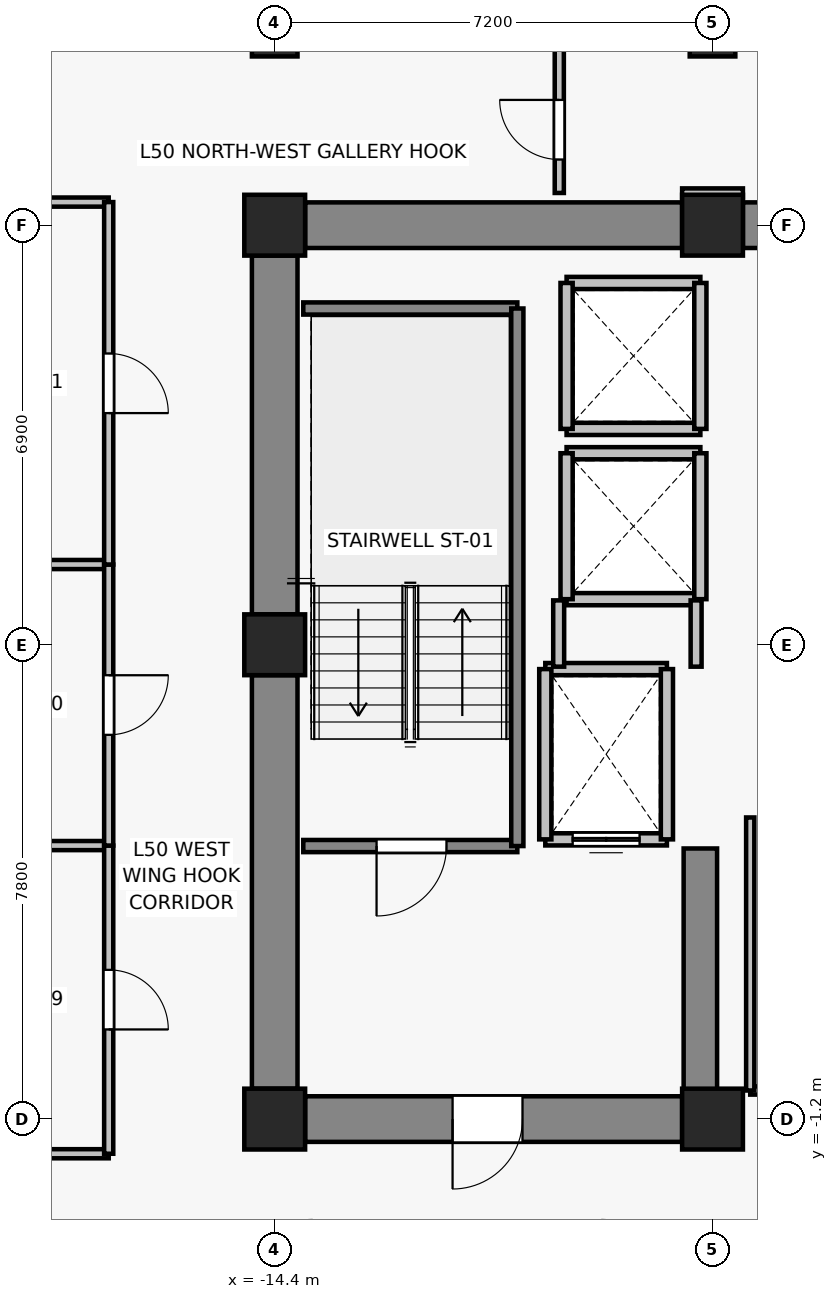
"""IFC4 building model, lengths in metres.
Left out: names, types, materials, properties, quantities, classifications, styles, units other than length and angle.
Written with IfcOpenShell. Run it as: python <this file> out.ifc"""

import sys

from ifc_helpers import new_model, si_unit, direction, frame, frame_2d, origin, origin_2d, place, context, subcontext, project, spatial, rectangle, extrude, source, transform, mapped, element, fill, save


model = new_model("IFC4")
c1 = context("Model", 3, precision=1e-05, world=origin(), true_north=direction((0.0, 1.0)))
c2 = subcontext(c1, "Body", "Model", "MODEL_VIEW")
j1 = project(units=[si_unit("LENGTHUNIT", "METRE"), si_unit("PLANEANGLEUNIT", "RADIAN")], contexts=[c1])
p1 = place(None, origin())
s1 = spatial("IfcSite", under=j1, at=p1, CompositionType="ELEMENT")
p2 = place(p1, origin())
s2 = spatial("IfcBuilding", under=s1, at=p2, CompositionType="ELEMENT")
p3 = place(p2, frame((0.0, 0.0, 179.2)))
s3 = spatial("IfcBuildingStorey", under=s2, at=p3, CompositionType="ELEMENT", Elevation=179.2)
for number, where, z_axis, x_axis in (
    (1, (-14.4, -1.2, 0.0), (0.0, 0.0, 1.0), (1.0, 0.0, 0.0)),
    (2, (-7.2, -1.2, 0.0), (0.0, 0.0, 1.0), (1.0, 0.0, 0.0)),
    (3, (-14.4, 6.6, 0.0), (0.0, 0.0, 1.0), (1.0, 0.0, 0.0)),
    (4, (-14.4, 13.5, 0.0), (0.0, 0.0, 1.0), (1.0, 0.0, 0.0)),
    (5, (-7.2, 13.5, 0.0), (0.0, 0.0, 1.0), (1.0, 0.0, 0.0)),
):
    element("IfcColumn", number, at=place(p3, frame(where, z_axis=z_axis, x_axis=x_axis)), inside=s3, PredefinedType="COLUMN", context=c2, shape_type="SweptSolid", body=[
        extrude(rectangle(XDim=1.0, YDim=1.0, at=origin_2d()), origin(), (0.0, 0.0, 1.0), 3.3),
    ])
for number, where, z_axis, x_axis in (
    (6, (-14.4, 16.65, 0.0), (0.0, 0.0, 1.0), (1.0, 0.0, 0.0)),
    (7, (-7.2, 16.65, 0.0), (0.0, 0.0, 1.0), (1.0, 0.0, 0.0)),
):
    element("IfcColumn", number, at=place(p3, frame(where, z_axis=z_axis, x_axis=x_axis)), inside=s3, PredefinedType="COLUMN", context=c2, shape_type="SweptSolid", body=[
        extrude(rectangle(XDim=0.75, YDim=0.75, at=origin_2d()), origin(), (0.0, 0.0, 1.0), 3.3),
    ])
p4 = place(p3, frame((-13.9, 13.5, 0.0), z_axis=(0.0, 0.0, 1.0), x_axis=(1.0, 0.0, 0.0)))
e8 = element("IfcWall", 8, at=p4, inside=s3, PredefinedType="SHEAR", context=c2, shape_type="SweptSolid", body=[
    extrude(rectangle(XDim=6.2, YDim=0.75, at=frame_2d((3.1, 0.0))), origin(), (0.0, 0.0, 1.0), 3.075),
])
p5 = place(p3, frame((-6.7, 13.5, 0.0), z_axis=(0.0, 0.0, 1.0), x_axis=(1.0, 0.0, 0.0)))
e9 = element("IfcWall", 9, at=p5, inside=s3, PredefinedType="SHEAR", context=c2, shape_type="SweptSolid", body=[
    extrude(rectangle(XDim=13.4, YDim=0.75, at=frame_2d((6.7, 0.0))), origin(), (0.0, 0.0, 1.0), 3.075),
])
p6 = place(p3, frame((-14.4, -0.7, 0.0), z_axis=(0.0, 0.0, 1.0), x_axis=(0.0, 1.0, 0.0)))
e10 = element("IfcWall", 10, at=p6, inside=s3, PredefinedType="SHEAR", context=c2, shape_type="SweptSolid", body=[
    extrude(rectangle(XDim=6.8, YDim=0.75, at=frame_2d((3.4, 0.0))), origin(), (0.0, 0.0, 1.0), 3.075),
])
p7 = place(p3, frame((-14.4, 7.1, 0.0), z_axis=(0.0, 0.0, 1.0), x_axis=(0.0, 1.0, 0.0)))
e11 = element("IfcWall", 11, at=p7, inside=s3, PredefinedType="SHEAR", context=c2, shape_type="SweptSolid", body=[
    extrude(rectangle(XDim=5.9, YDim=0.75, at=frame_2d((2.95, 0.0))), origin(), (0.0, 0.0, 1.0), 3.075),
])
p8 = place(p3, frame((-7.7, -1.2, 0.0), z_axis=(0.0, 0.0, 1.0), x_axis=(-1.0, 0.0, 0.0)))
e12 = element("IfcWall", 12, at=p8, inside=s3, PredefinedType="SHEAR", context=c2, shape_type="SweptSolid", body=[
    extrude(rectangle(XDim=6.2, YDim=0.75, at=frame_2d((3.1, 0.0))), origin(), (0.0, 0.0, 1.0), 3.075),
])
p9 = place(p8, frame((2.625, 0.0, 0.0)))
e13 = element("IfcOpeningElement", 13, at=p9, cuts=e12, PredefinedType="OPENING", context=c2, shape_type="SweptSolid", body=[
    extrude(rectangle(XDim=1.15, YDim=2.15, at=frame_2d((0.575, 1.075))), frame((0.0, 0.385, 0.0), z_axis=(0.0, -1.0, 0.0), x_axis=(1.0, 0.0, 0.0)), (0.0, 0.0, 1.0), 0.77),
])
p10 = place(p3, frame((-7.4, -0.825, 0.0), z_axis=(0.0, 0.0, 1.0), x_axis=(0.0, 1.0, 0.0)))
e14 = element("IfcWall", 14, at=p10, inside=s3, PredefinedType="SHEAR", context=c2, shape_type="SweptSolid", body=[
    extrude(rectangle(XDim=4.075, YDim=0.55, at=frame_2d((2.038, 0.0))), origin(), (0.0, 0.0, 1.0), 3.075),
])
p11 = place(p3, frame((-7.95, 3.4, 0.0), z_axis=(0.0, 0.0, 1.0), x_axis=(-1.0, 0.0, 0.0)))
e15 = element("IfcWall", 15, at=p11, inside=s3, PredefinedType="SOLIDWALL", context=c2, shape_type="SweptSolid", body=[
    extrude(rectangle(XDim=2.0, YDim=0.2, at=frame_2d((1.0, 0.0))), origin(), (0.0, 0.0, 1.0), 3.075),
])
p12 = place(p11, frame((0.45, 0.0, 0.0)))
e16 = element("IfcOpeningElement", 16, at=p12, cuts=e15, PredefinedType="OPENING", context=c2, shape_type="SweptSolid", body=[
    extrude(rectangle(XDim=1.1, YDim=2.2, at=frame_2d((0.55, 1.1))), frame((0.0, 0.11, 0.0), z_axis=(0.0, -1.0, 0.0), x_axis=(1.0, 0.0, 0.0)), (0.0, 0.0, 1.0), 0.22),
])
p13 = place(p3, frame((-9.95, 6.2, 0.0), z_axis=(0.0, 0.0, 1.0), x_axis=(1.0, 0.0, 0.0)))
e17 = element("IfcWall", 17, at=p13, inside=s3, PredefinedType="SOLIDWALL", context=c2, shape_type="SweptSolid", body=[
    extrude(rectangle(XDim=2.0, YDim=0.2, at=frame_2d((1.0, 0.0))), origin(), (0.0, 0.0, 1.0), 3.075),
])
for number, where, z_axis, x_axis in (
    (18, (-9.95, 3.4, 0.0), (0.0, 0.0, 1.0), (0.0, 1.0, 0.0)),
    (19, (-7.95, 6.2, 0.0), (0.0, 0.0, 1.0), (0.0, -1.0, 0.0)),
):
    element("IfcWall", number, at=place(p3, frame(where, z_axis=z_axis, x_axis=x_axis)), inside=s3, PredefinedType="SOLIDWALL", context=c2, shape_type="SweptSolid", body=[
        extrude(rectangle(XDim=2.8, YDim=0.2, at=frame_2d((1.4, 0.0))), origin(), (0.0, 0.0, 1.0), 3.075),
    ])
for number, where, z_axis, x_axis in (
    (20, (-7.4, 7.35, 0.0), (0.0, 0.0, 1.0), (-1.0, 0.0, 0.0)),
    (21, (-9.6, 9.75, 0.0), (0.0, 0.0, 1.0), (1.0, 0.0, 0.0)),
):
    element("IfcWall", number, at=place(p3, frame(where, z_axis=z_axis, x_axis=x_axis)), inside=s3, PredefinedType="SOLIDWALL", context=c2, shape_type="SweptSolid", body=[
        extrude(rectangle(XDim=2.2, YDim=0.2, at=frame_2d((1.1, 0.0))), origin(), (0.0, 0.0, 1.0), 2.565),
    ])
p14 = place(p3, frame((-9.6, 7.35, 0.0), z_axis=(0.0, 0.0, 1.0), x_axis=(0.0, 1.0, 0.0)))
e22 = element("IfcWall", 22, at=p14, inside=s3, PredefinedType="SOLIDWALL", context=c2, shape_type="SweptSolid", body=[
    extrude(rectangle(XDim=2.4, YDim=0.2, at=frame_2d((1.2, 0.0))), origin(), (0.0, 0.0, 1.0), 3.075),
])
p15 = place(p3, frame((-7.4, 9.75, 0.0), z_axis=(0.0, 0.0, 1.0), x_axis=(0.0, -1.0, 0.0)))
e23 = element("IfcWall", 23, at=p15, inside=s3, PredefinedType="SOLIDWALL", context=c2, shape_type="SweptSolid", body=[
    extrude(rectangle(XDim=2.4, YDim=0.2, at=frame_2d((1.2, 0.0))), origin(), (0.0, 0.0, 1.0), 2.565),
])
for number, where, z_axis, x_axis in (
    (24, (-7.4, 10.15, 0.0), (0.0, 0.0, 1.0), (-1.0, 0.0, 0.0)),
    (25, (-9.6, 12.55, 0.0), (0.0, 0.0, 1.0), (1.0, 0.0, 0.0)),
):
    element("IfcWall", number, at=place(p3, frame(where, z_axis=z_axis, x_axis=x_axis)), inside=s3, PredefinedType="SOLIDWALL", context=c2, shape_type="SweptSolid", body=[
        extrude(rectangle(XDim=2.2, YDim=0.2, at=frame_2d((1.1, 0.0))), origin(), (0.0, 0.0, 1.0), 2.565),
    ])
p16 = place(p3, frame((-9.6, 10.15, 0.0), z_axis=(0.0, 0.0, 1.0), x_axis=(0.0, 1.0, 0.0)))
e26 = element("IfcWall", 26, at=p16, inside=s3, PredefinedType="SOLIDWALL", context=c2, shape_type="SweptSolid", body=[
    extrude(rectangle(XDim=2.4, YDim=0.2, at=frame_2d((1.2, 0.0))), origin(), (0.0, 0.0, 1.0), 3.075),
])
p17 = place(p3, frame((-7.4, 12.55, 0.0), z_axis=(0.0, 0.0, 1.0), x_axis=(0.0, -1.0, 0.0)))
e27 = element("IfcWall", 27, at=p17, inside=s3, PredefinedType="SOLIDWALL", context=c2, shape_type="SweptSolid", body=[
    extrude(rectangle(XDim=2.4, YDim=0.2, at=frame_2d((1.2, 0.0))), origin(), (0.0, 0.0, 1.0), 2.565),
])
p18 = place(p3, frame((-10.41, 3.29, 0.0), z_axis=(0.0, 0.0, 1.0), x_axis=(-1.0, 0.0, 0.0)))
e28 = element("IfcWall", 28, at=p18, inside=s3, PredefinedType="SOLIDWALL", context=c2, shape_type="SweptSolid", body=[
    extrude(rectangle(XDim=3.52, YDim=0.2, at=frame_2d((1.76, 0.0))), origin(), (0.0, 0.0, 1.0), 3.075),
])
p19 = place(p18, frame((1.165, 0.0, 0.0)))
e29 = element("IfcOpeningElement", 29, at=p19, cuts=e28, PredefinedType="OPENING", context=c2, shape_type="SweptSolid", body=[
    extrude(rectangle(XDim=1.15, YDim=2.15, at=frame_2d((0.575, 1.075))), frame((0.0, 0.11, 0.0), z_axis=(0.0, -1.0, 0.0), x_axis=(1.0, 0.0, 0.0)), (0.0, 0.0, 1.0), 0.22),
])
p20 = place(p3, frame((-13.93, 12.13, 0.0), z_axis=(0.0, 0.0, 1.0), x_axis=(1.0, 0.0, 0.0)))
e30 = element("IfcWall", 30, at=p20, inside=s3, PredefinedType="SOLIDWALL", context=c2, shape_type="SweptSolid", body=[
    extrude(rectangle(XDim=3.52, YDim=0.2, at=frame_2d((1.76, 0.0))), origin(), (0.0, 0.0, 1.0), 3.075),
])
p21 = place(p3, frame((-10.41, 12.13, 0.0), z_axis=(0.0, 0.0, 1.0), x_axis=(0.0, -1.0, 0.0)))
e31 = element("IfcWall", 31, at=p21, inside=s3, PredefinedType="SOLIDWALL", context=c2, shape_type="SweptSolid", body=[
    extrude(rectangle(XDim=8.84, YDim=0.2, at=frame_2d((4.42, 0.0))), origin(), (0.0, 0.0, 1.0), 3.075),
])
p22 = place(p3, frame((-9.73, 6.24, 0.0), z_axis=(0.0, 0.0, 1.0), x_axis=(0.0, 1.0, 0.0)))
e32 = element("IfcWall", 32, at=p22, inside=s3, PredefinedType="PARTITIONING", context=c2, shape_type="SweptSolid", body=[
    extrude(rectangle(XDim=1.09, YDim=0.18, at=frame_2d((0.545, 0.0))), origin(), (0.0, 0.0, 1.0), 3.075),
])
p23 = place(p3, frame((-7.47, 7.33, 0.0), z_axis=(0.0, 0.0, 1.0), x_axis=(0.0, -1.0, 0.0)))
e33 = element("IfcWall", 33, at=p23, inside=s3, PredefinedType="PARTITIONING", context=c2, shape_type="SweptSolid", body=[
    extrude(rectangle(XDim=1.09, YDim=0.18, at=frame_2d((0.545, 0.0))), origin(), (0.0, 0.0, 1.0), 2.565),
])
p24 = place(p3, frame((-3.47, -0.73, 0.0), z_axis=(0.0, 0.0, 1.0), x_axis=(-1.0, 0.0, 0.0)))
e34 = element("IfcWall", 34, at=p24, inside=s3, PredefinedType="PARTITIONING", context=c2, shape_type="SweptSolid", body=[
    extrude(rectangle(XDim=3.11, YDim=0.135, at=frame_2d((1.555, 0.0))), origin(), (0.0, 0.0, 1.0), 3.075),
])
p25 = place(p24, frame((1.09, 0.0, 0.0)))
e35 = element("IfcOpeningElement", 35, at=p25, cuts=e34, PredefinedType="OPENING", context=c2, shape_type="SweptSolid", body=[
    extrude(rectangle(XDim=0.92, YDim=2.1, at=frame_2d((0.46, 1.05))), frame((0.0, 0.077, 0.0), z_axis=(0.0, -1.0, 0.0), x_axis=(1.0, 0.0, 0.0)), (0.0, 0.0, 1.0), 0.155),
])
p26 = place(p3, frame((-6.58, -0.73, 0.0), z_axis=(0.0, 0.0, 1.0), x_axis=(0.0, 1.0, 0.0)))
e36 = element("IfcWall", 36, at=p26, inside=s3, PredefinedType="PARTITIONING", context=c2, shape_type="SweptSolid", body=[
    extrude(rectangle(XDim=4.49, YDim=0.135, at=frame_2d((2.245, 0.0))), origin(), (0.0, 0.0, 1.0), 3.075),
])
for number, where, z_axis, x_axis in (
    (37, (-17.13, -1.77, 0.0), (0.0, 0.0, 1.0), (-1.0, 0.0, 0.0)),
    (38, (-22.53, 3.298, 0.0), (0.0, 0.0, 1.0), (1.0, 0.0, 0.0)),
):
    element("IfcWall", number, at=place(p3, frame(where, z_axis=z_axis, x_axis=x_axis)), inside=s3, PredefinedType="PARTITIONING", context=c2, shape_type="SweptSolid", body=[
        extrude(rectangle(XDim=5.4, YDim=0.15, at=frame_2d((2.7, 0.0))), origin(), (0.0, 0.0, 1.0), 2.565),
    ])
p27 = place(p3, frame((-17.13, 3.298, 0.0), z_axis=(0.0, 0.0, 1.0), x_axis=(0.0, -1.0, 0.0)))
e39 = element("IfcWall", 39, at=p27, inside=s3, PredefinedType="PARTITIONING", context=c2, shape_type="SweptSolid", body=[
    extrude(rectangle(XDim=5.068, YDim=0.15, at=frame_2d((2.534, 0.0))), origin(), (0.0, 0.0, 1.0), 2.565),
])
p28 = place(p27, frame((2.044, 0.0, 0.0)))
e40 = element("IfcOpeningElement", 40, at=p28, cuts=e39, PredefinedType="OPENING", context=c2, shape_type="SweptSolid", body=[
    extrude(rectangle(XDim=0.98, YDim=2.15, at=frame_2d((0.49, 1.075))), frame((0.0, 0.085, 0.0), z_axis=(0.0, -1.0, 0.0), x_axis=(1.0, 0.0, 0.0)), (0.0, 0.0, 1.0), 0.17),
])
p29 = place(p3, frame((-22.53, 7.92, 0.0), z_axis=(0.0, 0.0, 1.0), x_axis=(1.0, 0.0, 0.0)))
e41 = element("IfcWall", 41, at=p29, inside=s3, PredefinedType="PARTITIONING", context=c2, shape_type="SweptSolid", body=[
    extrude(rectangle(XDim=5.4, YDim=0.15, at=frame_2d((2.7, 0.0))), origin(), (0.0, 0.0, 1.0), 2.565),
])
p30 = place(p3, frame((-17.13, 7.92, 0.0), z_axis=(0.0, 0.0, 1.0), x_axis=(0.0, -1.0, 0.0)))
e42 = element("IfcWall", 42, at=p30, inside=s3, PredefinedType="PARTITIONING", context=c2, shape_type="SweptSolid", body=[
    extrude(rectangle(XDim=4.622, YDim=0.15, at=frame_2d((2.311, 0.0))), origin(), (0.0, 0.0, 1.0), 3.075),
])
p31 = place(p30, frame((1.821, 0.0, 0.0)))
e43 = element("IfcOpeningElement", 43, at=p31, cuts=e42, PredefinedType="OPENING", context=c2, shape_type="SweptSolid", body=[
    extrude(rectangle(XDim=0.98, YDim=2.15, at=frame_2d((0.49, 1.075))), frame((0.0, 0.085, 0.0), z_axis=(0.0, -1.0, 0.0), x_axis=(1.0, 0.0, 0.0)), (0.0, 0.0, 1.0), 0.17),
])
p32 = place(p3, frame((-22.53, 13.88, 0.0), z_axis=(0.0, 0.0, 1.0), x_axis=(1.0, 0.0, 0.0)))
e44 = element("IfcWall", 44, at=p32, inside=s3, PredefinedType="PARTITIONING", context=c2, shape_type="SweptSolid", body=[
    extrude(rectangle(XDim=5.4, YDim=0.15, at=frame_2d((2.7, 0.0))), origin(), (0.0, 0.0, 1.0), 3.075),
])
p33 = place(p3, frame((-17.13, 13.88, 0.0), z_axis=(0.0, 0.0, 1.0), x_axis=(0.0, -1.0, 0.0)))
e45 = element("IfcWall", 45, at=p33, inside=s3, PredefinedType="PARTITIONING", context=c2, shape_type="SweptSolid", body=[
    extrude(rectangle(XDim=5.96, YDim=0.15, at=frame_2d((2.98, 0.0))), origin(), (0.0, 0.0, 1.0), 2.565),
])
p34 = place(p33, frame((2.49, 0.0, 0.0)))
e46 = element("IfcOpeningElement", 46, at=p34, cuts=e45, PredefinedType="OPENING", context=c2, shape_type="SweptSolid", body=[
    extrude(rectangle(XDim=0.98, YDim=2.15, at=frame_2d((0.49, 1.075))), frame((0.0, 0.085, 0.0), z_axis=(0.0, -1.0, 0.0), x_axis=(1.0, 0.0, 0.0)), (0.0, 0.0, 1.0), 0.17),
])
p35 = place(p3, frame((-6.7, 14.03, 0.0), z_axis=(0.0, 0.0, 1.0), x_axis=(-1.0, 0.0, 0.0)))
e47 = element("IfcWall", 47, at=p35, inside=s3, PredefinedType="PARTITIONING", context=c2, shape_type="SweptSolid", body=[
    extrude(rectangle(XDim=1.0, YDim=0.15, at=frame_2d((0.5, 0.0))), origin(), (0.0, 0.0, 1.0), 2.565),
])
p36 = place(p3, frame((-9.72, 14.03, 0.0), z_axis=(0.0, 0.0, 1.0), x_axis=(0.0, 1.0, 0.0)))
e48 = element("IfcWall", 48, at=p36, inside=s3, PredefinedType="PARTITIONING", context=c2, shape_type="SweptSolid", body=[
    extrude(rectangle(XDim=3.3, YDim=0.15, at=frame_2d((1.65, 0.0))), origin(), (0.0, 0.0, 1.0), 2.565),
])
p37 = place(p36, frame((0.55, 0.0, 0.0)))
e49 = element("IfcOpeningElement", 49, at=p37, cuts=e48, PredefinedType="OPENING", context=c2, shape_type="SweptSolid", body=[
    extrude(rectangle(XDim=0.98, YDim=2.15, at=frame_2d((0.49, 1.075))), frame((0.0, 0.085, 0.0), z_axis=(0.0, -1.0, 0.0), x_axis=(1.0, 0.0, 0.0)), (0.0, 0.0, 1.0), 0.17),
])
m1 = source(origin(), c2, "Body", "SweptSolid", [
    extrude(rectangle(XDim=1.1, YDim=2.2, at=frame_2d((0.55, 1.1))), frame((0.0, 0.025, 0.0), z_axis=(0.0, -1.0, 0.0), x_axis=(1.0, 0.0, 0.0)), (0.0, 0.0, 1.0), 0.05),
])
p38 = place(p12, origin())
e50 = element("IfcDoor", 50, at=p38, inside=s3, OperationType="DOUBLE_DOOR_SLIDING", PredefinedType="DOOR", context=c2, shape_type="MappedRepresentation", body=[
    mapped(m1, transform((0.0, 0.0, 0.0), x_axis=(1.0, 0.0, 0.0), y_axis=(0.0, 1.0, 0.0), z_axis=(0.0, 0.0, 1.0), scale=1.0)),
])
fill(e16, e50)
m2 = source(origin(), c2, "Body", "SweptSolid", [
    extrude(rectangle(XDim=1.15, YDim=2.15, at=frame_2d((0.575, 1.075))), frame((0.0, 0.025, 0.0), z_axis=(0.0, -1.0, 0.0), x_axis=(1.0, 0.0, 0.0)), (0.0, 0.0, 1.0), 0.05),
])
p39 = place(p19, origin())
e51 = element("IfcDoor", 51, at=p39, inside=s3, OperationType="SINGLE_SWING_RIGHT", PredefinedType="DOOR", context=c2, shape_type="MappedRepresentation", body=[
    mapped(m2, transform((0.0, 0.0, 0.0), x_axis=(1.0, 0.0, 0.0), y_axis=(0.0, 1.0, 0.0), z_axis=(0.0, 0.0, 1.0), scale=1.0)),
])
fill(e29, e51)
p40 = place(p9, origin())
e52 = element("IfcDoor", 52, at=p40, inside=s3, OperationType="SINGLE_SWING_RIGHT", PredefinedType="DOOR", context=c2, shape_type="MappedRepresentation", body=[
    mapped(m2, transform((0.0, 0.0, 0.0), x_axis=(1.0, 0.0, 0.0), y_axis=(0.0, 1.0, 0.0), z_axis=(0.0, 0.0, 1.0), scale=1.0)),
])
fill(e13, e52)
m3 = source(origin(), c2, "Body", "SweptSolid", [
    extrude(rectangle(XDim=0.98, YDim=2.15, at=frame_2d((0.49, 1.075))), frame((0.0, 0.025, 0.0), z_axis=(0.0, -1.0, 0.0), x_axis=(1.0, 0.0, 0.0)), (0.0, 0.0, 1.0), 0.05),
])
p41 = place(p28, origin())
e53 = element("IfcDoor", 53, at=p41, inside=s3, OperationType="SINGLE_SWING_RIGHT", PredefinedType="DOOR", context=c2, shape_type="MappedRepresentation", body=[
    mapped(m3, transform((0.0, 0.0, 0.0), x_axis=(1.0, 0.0, 0.0), y_axis=(0.0, 1.0, 0.0), z_axis=(0.0, 0.0, 1.0), scale=1.0)),
])
fill(e40, e53)
p42 = place(p31, origin())
e54 = element("IfcDoor", 54, at=p42, inside=s3, OperationType="SINGLE_SWING_LEFT", PredefinedType="DOOR", context=c2, shape_type="MappedRepresentation", body=[
    mapped(m3, transform((0.0, 0.0, 0.0), x_axis=(1.0, 0.0, 0.0), y_axis=(0.0, 1.0, 0.0), z_axis=(0.0, 0.0, 1.0), scale=1.0)),
])
fill(e43, e54)
p43 = place(p34, origin())
e55 = element("IfcDoor", 55, at=p43, inside=s3, OperationType="SINGLE_SWING_RIGHT", PredefinedType="DOOR", context=c2, shape_type="MappedRepresentation", body=[
    mapped(m3, transform((0.0, 0.0, 0.0), x_axis=(1.0, 0.0, 0.0), y_axis=(0.0, 1.0, 0.0), z_axis=(0.0, 0.0, 1.0), scale=1.0)),
])
fill(e46, e55)
p44 = place(p37, origin())
e56 = element("IfcDoor", 56, at=p44, inside=s3, OperationType="SINGLE_SWING_RIGHT", PredefinedType="DOOR", context=c2, shape_type="MappedRepresentation", body=[
    mapped(m3, transform((0.0, 0.0, 0.0), x_axis=(1.0, 0.0, 0.0), y_axis=(0.0, 1.0, 0.0), z_axis=(0.0, 0.0, 1.0), scale=1.0)),
])
fill(e49, e56)
save(model, sys.argv[1])
